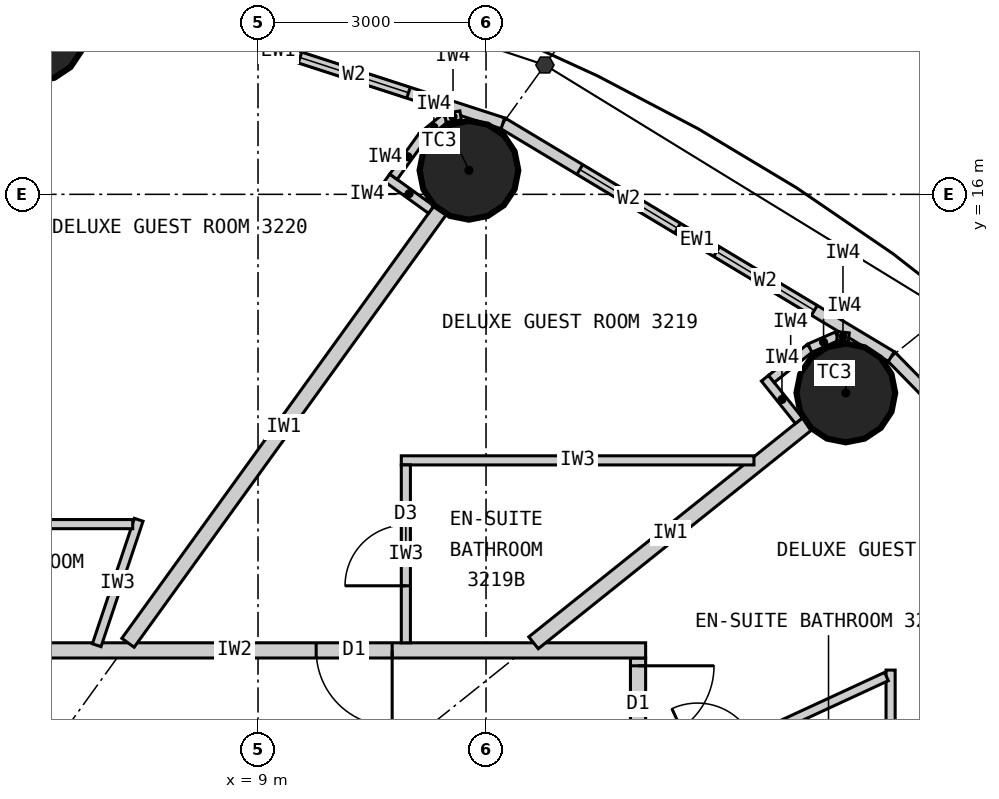
"""IFC4 building model, lengths in metres.
Left out: names, types, materials, properties, quantities, classifications, styles, units other than length and angle.
Written with IfcOpenShell. Run it as: python <this file> out.ifc"""

import sys

from ifc_helpers import new_model, si_unit, direction, frame, frame_2d, origin, origin_2d, place, context, subcontext, project, spatial, rectangle, circle, extrude, element, fill, save


model = new_model("IFC4")
c1 = context("Model", 3, precision=1e-05, world=origin(), true_north=direction((0.0, 1.0)))
c2 = subcontext(c1, "Body", "Model", "MODEL_VIEW")
j1 = project(units=[si_unit("LENGTHUNIT", "METRE"), si_unit("PLANEANGLEUNIT", "RADIAN")], contexts=[c1])
p1 = place(None, origin())
s1 = spatial("IfcSite", under=j1, at=p1, CompositionType="ELEMENT")
p2 = place(p1, origin())
s2 = spatial("IfcBuilding", under=s1, at=p2, CompositionType="ELEMENT")
p3 = place(p2, frame((0.0, 0.0, 125.4)))
s3 = spatial("IfcBuildingStorey", under=s2, at=p3, CompositionType="ELEMENT", Elevation=125.4)
for number, where, z_axis, x_axis in (
    (1, (16.734, 13.387, 0.0), (0.0, 0.0, 1.0), (1.0, 0.0, 0.0)),
    (2, (11.775, 16.316, 0.0), (0.0, 0.0, 1.0), (1.0, 0.0, 0.0)),
    (3, (6.074, 18.135, 0.0), (0.0, 0.0, 1.0), (1.0, 0.0, 0.0)),
):
    element("IfcColumn", number, at=place(p3, frame(where, z_axis=z_axis, x_axis=x_axis)), inside=s3, PredefinedType="COLUMN", context=c2, shape_type="SweptSolid", body=[
        extrude(circle(Radius=0.65, at=origin_2d()), origin(), (0.0, 0.0, 1.0), 3.3),
    ])
p4 = place(p3, frame((21.287, 9.832, 0.0), z_axis=(0.0, 0.0, 1.0), x_axis=(-0.700136650834, 0.714008872605, 0.0)))
e4 = element("IfcWall", 4, at=p4, inside=s3, PredefinedType="ELEMENTEDWALL", context=c2, shape_type="SweptSolid", body=[
    extrude(rectangle(XDim=5.649, YDim=0.15, at=frame_2d((2.825, 0.0))), origin(), (0.0, 0.0, 1.0), 3.12),
])
p5 = place(p4, frame((1.025, 0.0, 0.9)))
e5 = element("IfcOpeningElement", 5, at=p5, cuts=e4, PredefinedType="OPENING", context=c2, shape_type="SweptSolid", body=[
    extrude(rectangle(XDim=1.5, YDim=1.9, at=frame_2d((0.75, 0.95))), frame((0.0, 0.085, 0.0), z_axis=(0.0, -1.0, 0.0), x_axis=(1.0, 0.0, 0.0)), (0.0, 0.0, 1.0), 0.17),
])
p6 = place(p4, frame((3.125, 0.0, 0.9)))
e6 = element("IfcOpeningElement", 6, at=p6, cuts=e4, PredefinedType="OPENING", context=c2, shape_type="SweptSolid", body=[
    extrude(rectangle(XDim=1.5, YDim=1.9, at=frame_2d((0.75, 0.95))), frame((0.0, 0.085, 0.0), z_axis=(0.0, -1.0, 0.0), x_axis=(1.0, 0.0, 0.0)), (0.0, 0.0, 1.0), 0.17),
])
p7 = place(p3, frame((17.332, 13.866, 0.0), z_axis=(0.0, 0.0, 1.0), x_axis=(-0.857308573723, 0.514802884044, 0.0)))
e7 = element("IfcWall", 7, at=p7, inside=s3, PredefinedType="ELEMENTEDWALL", context=c2, shape_type="SweptSolid", body=[
    extrude(rectangle(XDim=5.961, YDim=0.15, at=frame_2d((2.98, 0.0))), origin(), (0.0, 0.0, 1.0), 3.12),
])
p8 = place(p7, frame((1.181, 0.0, 0.9)))
e8 = element("IfcOpeningElement", 8, at=p8, cuts=e7, PredefinedType="OPENING", context=c2, shape_type="SweptSolid", body=[
    extrude(rectangle(XDim=1.5, YDim=1.9, at=frame_2d((0.75, 0.95))), frame((0.0, 0.085, 0.0), z_axis=(0.0, -1.0, 0.0), x_axis=(1.0, 0.0, 0.0)), (0.0, 0.0, 1.0), 0.17),
])
p9 = place(p7, frame((3.281, 0.0, 0.9)))
e9 = element("IfcOpeningElement", 9, at=p9, cuts=e7, PredefinedType="OPENING", context=c2, shape_type="SweptSolid", body=[
    extrude(rectangle(XDim=1.5, YDim=1.9, at=frame_2d((0.75, 0.95))), frame((0.0, 0.085, 0.0), z_axis=(0.0, -1.0, 0.0), x_axis=(1.0, 0.0, 0.0)), (0.0, 0.0, 1.0), 0.17),
])
p10 = place(p3, frame((12.221, 16.935, 0.0), z_axis=(0.0, 0.0, 1.0), x_axis=(-0.951272691506, 0.308350881944, 0.0)))
e10 = element("IfcWall", 10, at=p10, inside=s3, PredefinedType="ELEMENTEDWALL", context=c2, shape_type="SweptSolid", body=[
    extrude(rectangle(XDim=6.211, YDim=0.15, at=frame_2d((3.105, 0.0))), origin(), (0.0, 0.0, 1.0), 3.12),
])
p11 = place(p10, frame((1.305, 0.0, 0.9)))
e11 = element("IfcOpeningElement", 11, at=p11, cuts=e10, PredefinedType="OPENING", context=c2, shape_type="SweptSolid", body=[
    extrude(rectangle(XDim=1.5, YDim=1.9, at=frame_2d((0.75, 0.95))), frame((0.0, 0.085, 0.0), z_axis=(0.0, -1.0, 0.0), x_axis=(1.0, 0.0, 0.0)), (0.0, 0.0, 1.0), 0.17),
])
p12 = place(p10, frame((3.405, 0.0, 0.9)))
e12 = element("IfcOpeningElement", 12, at=p12, cuts=e10, PredefinedType="OPENING", context=c2, shape_type="SweptSolid", body=[
    extrude(rectangle(XDim=1.5, YDim=1.9, at=frame_2d((0.75, 0.95))), frame((0.0, 0.085, 0.0), z_axis=(0.0, -1.0, 0.0), x_axis=(1.0, 0.0, 0.0)), (0.0, 0.0, 1.0), 0.17),
])
p13 = place(p3, frame((14.0, -9.9, 0.0), z_axis=(0.0, 0.0, 1.0), x_axis=(0.0, 1.0, 0.0)))
e13 = element("IfcWall", 13, at=p13, inside=s3, PredefinedType="PARTITIONING", context=c2, shape_type="SweptSolid", body=[
    extrude(rectangle(XDim=19.8, YDim=0.2, at=frame_2d((9.9, 0.0))), origin(), (0.0, 0.0, 1.0), 3.12),
])
p14 = place(p13, frame((2.478, 0.0, 0.0)))
e14 = element("IfcOpeningElement", 14, at=p14, cuts=e13, PredefinedType="OPENING", context=c2, shape_type="SweptSolid", body=[
    extrude(rectangle(XDim=1.0, YDim=2.2, at=frame_2d((0.5, 1.1))), frame((0.0, 0.11, 0.0), z_axis=(0.0, -1.0, 0.0), x_axis=(1.0, 0.0, 0.0)), (0.0, 0.0, 1.0), 0.22),
])
p15 = place(p13, frame((8.838, 0.0, 0.0)))
e15 = element("IfcOpeningElement", 15, at=p15, cuts=e13, PredefinedType="OPENING", context=c2, shape_type="SweptSolid", body=[
    extrude(rectangle(XDim=1.0, YDim=2.2, at=frame_2d((0.5, 1.1))), frame((0.0, 0.11, 0.0), z_axis=(0.0, -1.0, 0.0), x_axis=(1.0, 0.0, 0.0)), (0.0, 0.0, 1.0), 0.22),
])
p16 = place(p13, frame((13.742, 0.0, 0.0)))
e16 = element("IfcOpeningElement", 16, at=p16, cuts=e13, PredefinedType="OPENING", context=c2, shape_type="SweptSolid", body=[
    extrude(rectangle(XDim=1.0, YDim=2.2, at=frame_2d((0.5, 1.1))), frame((0.0, 0.11, 0.0), z_axis=(0.0, -1.0, 0.0), x_axis=(1.0, 0.0, 0.0)), (0.0, 0.0, 1.0), 0.22),
])
p17 = place(p13, frame((18.698, 0.0, 0.0)))
e17 = element("IfcOpeningElement", 17, at=p17, cuts=e13, PredefinedType="OPENING", context=c2, shape_type="SweptSolid", body=[
    extrude(rectangle(XDim=1.0, YDim=2.2, at=frame_2d((0.5, 1.1))), frame((0.0, 0.11, 0.0), z_axis=(0.0, -1.0, 0.0), x_axis=(1.0, 0.0, 0.0)), (0.0, 0.0, 1.0), 0.22),
])
p18 = place(p3, frame((3.283, 10.0, 0.0), z_axis=(0.0, 0.0, 1.0), x_axis=(1.0, 0.0, 0.0)))
e18 = element("IfcWall", 18, at=p18, inside=s3, PredefinedType="PARTITIONING", context=c2, shape_type="SweptSolid", body=[
    extrude(rectangle(XDim=10.817, YDim=0.2, at=frame_2d((5.409, 0.0))), origin(), (0.0, 0.0, 1.0), 3.12),
])
p19 = place(p18, frame((6.482, 0.0, 0.0)))
e19 = element("IfcOpeningElement", 19, at=p19, cuts=e18, PredefinedType="OPENING", context=c2, shape_type="SweptSolid", body=[
    extrude(rectangle(XDim=1.0, YDim=2.2, at=frame_2d((0.5, 1.1))), frame((0.0, 0.11, 0.0), z_axis=(0.0, -1.0, 0.0), x_axis=(1.0, 0.0, 0.0)), (0.0, 0.0, 1.0), 0.22),
])
p20 = place(p3, frame((14.1, 6.512, 0.0), z_axis=(0.0, 0.0, 1.0), x_axis=(0.907833019998, 0.419331858797, 0.0)))
e20 = element("IfcWall", 20, at=p20, inside=s3, PredefinedType="PARTITIONING", context=c2, shape_type="SweptSolid", body=[
    extrude(rectangle(XDim=6.505, YDim=0.2, at=frame_2d((3.252, 0.0))), origin(), (0.0, 0.0, 1.0), 2.27),
])
p21 = place(p3, frame((12.625, 10.1, 0.0), z_axis=(0.0, 0.0, 1.0), x_axis=(0.780863644897, 0.624701503182, 0.0)))
e21 = element("IfcWall", 21, at=p21, inside=s3, PredefinedType="PARTITIONING", context=c2, shape_type="SweptSolid", body=[
    extrude(rectangle(XDim=4.612, YDim=0.2, at=frame_2d((2.306, 0.0))), origin(), (0.0, 0.0, 1.0), 2.37),
])
p22 = place(p3, frame((7.289, 10.1, 0.0), z_axis=(0.0, 0.0, 1.0), x_axis=(0.585217367024, 0.81087645997, 0.0)))
e22 = element("IfcWall", 22, at=p22, inside=s3, PredefinedType="PARTITIONING", context=c2, shape_type="SweptSolid", body=[
    extrude(rectangle(XDim=7.016, YDim=0.2, at=frame_2d((3.508, 0.0))), origin(), (0.0, 0.0, 1.0), 2.37),
])
p23 = place(p3, frame((17.323, 8.101, 0.0), z_axis=(0.0, 0.0, 1.0), x_axis=(0.0, 1.0, 0.0)))
e23 = element("IfcWall", 23, at=p23, inside=s3, PredefinedType="PARTITIONING", context=c2, shape_type="SweptSolid", body=[
    extrude(rectangle(XDim=1.64, YDim=0.12, at=frame_2d((0.82, 0.0))), origin(), (0.0, 0.0, 1.0), 3.12),
])
p24 = place(p3, frame((14.1, 8.193, 0.0), z_axis=(0.0, 0.0, 1.0), x_axis=(0.907836493557, 0.419324338628, 0.0)))
e24 = element("IfcWall", 24, at=p24, inside=s3, PredefinedType="PARTITIONING", context=c2, shape_type="SweptSolid", body=[
    extrude(rectangle(XDim=3.49, YDim=0.12, at=frame_2d((1.745, 0.0))), origin(), (0.0, 0.0, 1.0), 3.12),
])
p25 = place(p24, frame((0.75, 0.0, 0.0)))
e25 = element("IfcOpeningElement", 25, at=p25, cuts=e24, PredefinedType="OPENING", context=c2, shape_type="SweptSolid", body=[
    extrude(rectangle(XDim=0.8, YDim=2.1, at=frame_2d((0.4, 1.05))), frame((0.0, 0.07, 0.0), z_axis=(0.0, -1.0, 0.0), x_axis=(1.0, 0.0, 0.0)), (0.0, 0.0, 1.0), 0.14),
])
p26 = place(p3, frame((15.525, 12.5, 0.0), z_axis=(0.0, 0.0, 1.0), x_axis=(-1.0, 0.0, 0.0)))
e26 = element("IfcWall", 26, at=p26, inside=s3, PredefinedType="PARTITIONING", context=c2, shape_type="SweptSolid", body=[
    extrude(rectangle(XDim=4.64, YDim=0.12, at=frame_2d((2.32, 0.0))), origin(), (0.0, 0.0, 1.0), 3.12),
])
p27 = place(p3, frame((10.945, 10.1, 0.0), z_axis=(0.0, 0.0, 1.0), x_axis=(0.0, 1.0, 0.0)))
e27 = element("IfcWall", 27, at=p27, inside=s3, PredefinedType="PARTITIONING", context=c2, shape_type="SweptSolid", body=[
    extrude(rectangle(XDim=2.34, YDim=0.12, at=frame_2d((1.17, 0.0))), origin(), (0.0, 0.0, 1.0), 3.12),
])
p28 = place(p27, frame((0.75, 0.0, 0.0)))
e28 = element("IfcOpeningElement", 28, at=p28, cuts=e27, PredefinedType="OPENING", context=c2, shape_type="SweptSolid", body=[
    extrude(rectangle(XDim=0.8, YDim=2.1, at=frame_2d((0.4, 1.05))), frame((0.0, 0.07, 0.0), z_axis=(0.0, -1.0, 0.0), x_axis=(1.0, 0.0, 0.0)), (0.0, 0.0, 1.0), 0.14),
])
p29 = place(p3, frame((6.878, 10.068, 0.0), z_axis=(0.0, 0.0, 1.0), x_axis=(0.317532394508, 0.948247424694, 0.0)))
e29 = element("IfcWall", 29, at=p29, inside=s3, PredefinedType="PARTITIONING", context=c2, shape_type="SweptSolid", body=[
    extrude(rectangle(XDim=1.74, YDim=0.12, at=frame_2d((0.87, 0.0))), origin(), (0.0, 0.0, 1.0), 3.12),
])
p30 = place(p3, frame((4.011, 11.661, 0.0), z_axis=(0.0, 0.0, 1.0), x_axis=(1.0, 0.0, 0.0)))
e30 = element("IfcWall", 30, at=p30, inside=s3, PredefinedType="PARTITIONING", context=c2, shape_type="SweptSolid", body=[
    extrude(rectangle(XDim=3.34, YDim=0.12, at=frame_2d((1.67, 0.0))), origin(), (0.0, 0.0, 1.0), 3.12),
])
p31 = place(p30, frame((0.75, 0.0, 0.0)))
e31 = element("IfcOpeningElement", 31, at=p31, cuts=e30, PredefinedType="OPENING", context=c2, shape_type="SweptSolid", body=[
    extrude(rectangle(XDim=0.8, YDim=2.1, at=frame_2d((0.4, 1.05))), frame((0.0, 0.07, 0.0), z_axis=(0.0, -1.0, 0.0), x_axis=(1.0, 0.0, 0.0)), (0.0, 0.0, 1.0), 0.14),
])
p32 = place(p3, frame((16.117, 13.022, 0.0), z_axis=(0.0, 0.0, 1.0), x_axis=(-0.62465344249, 0.780902091677, 0.0)))
e32 = element("IfcWall", 32, at=p32, inside=s3, PredefinedType="PARTITIONING", context=c2, shape_type="SweptSolid", body=[
    extrude(rectangle(XDim=0.716, YDim=0.12, at=frame_2d((0.358, 0.0))), origin(), (0.0, 0.0, 1.0), 3.12),
])
p33 = place(p3, frame((15.754, 13.571, 0.0), z_axis=(0.0, 0.0, 1.0), x_axis=(0.780905453553, 0.624649239663, 0.0)))
e33 = element("IfcWall", 33, at=p33, inside=s3, PredefinedType="PARTITIONING", context=c2, shape_type="SweptSolid", body=[
    extrude(rectangle(XDim=0.65, YDim=0.12, at=frame_2d((0.325, 0.0))), origin(), (0.0, 0.0, 1.0), 3.12),
])
p34 = place(p3, frame((16.262, 13.977, 0.0), z_axis=(0.0, 0.0, 1.0), x_axis=(0.915985403703, 0.401211590314, 0.0)))
e34 = element("IfcWall", 34, at=p34, inside=s3, PredefinedType="PARTITIONING", context=c2, shape_type="SweptSolid", body=[
    extrude(rectangle(XDim=0.391, YDim=0.12, at=frame_2d((0.196, 0.0))), origin(), (0.0, 0.0, 1.0), 3.12),
])
p35 = place(p3, frame((16.62, 14.134, 0.0), z_axis=(0.0, 0.0, 1.0), x_axis=(0.993941871493, -0.109907033867, 0.0)))
e35 = element("IfcWall", 35, at=p35, inside=s3, PredefinedType="PARTITIONING", context=c2, shape_type="SweptSolid", body=[
    extrude(rectangle(XDim=0.153, YDim=0.12, at=frame_2d((0.077, 0.0))), origin(), (0.0, 0.0, 1.0), 3.12),
])
p36 = place(p3, frame((11.279, 15.799, 0.0), z_axis=(0.0, 0.0, 1.0), x_axis=(-0.810912957127, 0.585166793285, 0.0)))
e36 = element("IfcWall", 36, at=p36, inside=s3, PredefinedType="PARTITIONING", context=c2, shape_type="SweptSolid", body=[
    extrude(rectangle(XDim=0.716, YDim=0.12, at=frame_2d((0.358, 0.0))), origin(), (0.0, 0.0, 1.0), 3.12),
])
p37 = place(p3, frame((10.782, 16.231, 0.0), z_axis=(0.0, 0.0, 1.0), x_axis=(0.585175102182, 0.810906961239, 0.0)))
e37 = element("IfcWall", 37, at=p37, inside=s3, PredefinedType="PARTITIONING", context=c2, shape_type="SweptSolid", body=[
    extrude(rectangle(XDim=0.65, YDim=0.12, at=frame_2d((0.325, 0.0))), origin(), (0.0, 0.0, 1.0), 3.12),
])
p38 = place(p3, frame((11.162, 16.759, 0.0), z_axis=(0.0, 0.0, 1.0), x_axis=(0.775178428527, 0.63174235567, 0.0)))
e38 = element("IfcWall", 38, at=p38, inside=s3, PredefinedType="PARTITIONING", context=c2, shape_type="SweptSolid", body=[
    extrude(rectangle(XDim=0.392, YDim=0.12, at=frame_2d((0.196, 0.0))), origin(), (0.0, 0.0, 1.0), 3.12),
])
p39 = place(p3, frame((11.466, 17.006, 0.0), z_axis=(0.0, 0.0, 1.0), x_axis=(0.987228877621, 0.15930832744, 0.0)))
e39 = element("IfcWall", 39, at=p39, inside=s3, PredefinedType="PARTITIONING", context=c2, shape_type="SweptSolid", body=[
    extrude(rectangle(XDim=0.202, YDim=0.12, at=frame_2d((0.101, 0.0))), origin(), (0.0, 0.0, 1.0), 3.12),
])
p40 = place(p8, origin())
e40 = element("IfcWindow", 40, at=p40, inside=s3, PartitioningType="SINGLE_PANEL", PredefinedType="WINDOW", context=c2, shape_type="SweptSolid", body=[
    extrude(rectangle(XDim=1.5, YDim=1.9, at=frame_2d((0.75, 0.95))), frame((0.0, 0.03, 0.0), z_axis=(0.0, -1.0, 0.0), x_axis=(1.0, 0.0, 0.0)), (0.0, 0.0, 1.0), 0.06),
])
fill(e8, e40)
p41 = place(p9, origin())
e41 = element("IfcWindow", 41, at=p41, inside=s3, PartitioningType="SINGLE_PANEL", PredefinedType="WINDOW", context=c2, shape_type="SweptSolid", body=[
    extrude(rectangle(XDim=1.5, YDim=1.9, at=frame_2d((0.75, 0.95))), frame((0.0, 0.03, 0.0), z_axis=(0.0, -1.0, 0.0), x_axis=(1.0, 0.0, 0.0)), (0.0, 0.0, 1.0), 0.06),
])
fill(e9, e41)
p42 = place(p11, origin())
e42 = element("IfcWindow", 42, at=p42, inside=s3, PartitioningType="SINGLE_PANEL", PredefinedType="WINDOW", context=c2, shape_type="SweptSolid", body=[
    extrude(rectangle(XDim=1.5, YDim=1.9, at=frame_2d((0.75, 0.95))), frame((0.0, 0.03, 0.0), z_axis=(0.0, -1.0, 0.0), x_axis=(1.0, 0.0, 0.0)), (0.0, 0.0, 1.0), 0.06),
])
fill(e11, e42)
p43 = place(p17, origin())
e43 = element("IfcDoor", 43, at=p43, inside=s3, OperationType="SINGLE_SWING_RIGHT", PredefinedType="DOOR", context=c2, shape_type="SweptSolid", body=[
    extrude(rectangle(XDim=1.0, YDim=2.2, at=frame_2d((0.5, 1.1))), frame((0.0, 0.025, 0.0), z_axis=(0.0, -1.0, 0.0), x_axis=(1.0, 0.0, 0.0)), (0.0, 0.0, 1.0), 0.05),
])
fill(e17, e43)
p44 = place(p28, origin())
e44 = element("IfcDoor", 44, at=p44, inside=s3, OperationType="SINGLE_SWING_LEFT", PredefinedType="DOOR", context=c2, shape_type="SweptSolid", body=[
    extrude(rectangle(XDim=0.8, YDim=2.1, at=frame_2d((0.4, 1.05))), frame((0.0, 0.025, 0.0), z_axis=(0.0, -1.0, 0.0), x_axis=(1.0, 0.0, 0.0)), (0.0, 0.0, 1.0), 0.05),
])
fill(e28, e44)
p45 = place(p19, origin())
e45 = element("IfcDoor", 45, at=p45, inside=s3, OperationType="SINGLE_SWING_RIGHT", PredefinedType="DOOR", context=c2, shape_type="SweptSolid", body=[
    extrude(rectangle(XDim=1.0, YDim=2.2, at=frame_2d((0.5, 1.1))), frame((0.0, 0.025, 0.0), z_axis=(0.0, -1.0, 0.0), x_axis=(1.0, 0.0, 0.0)), (0.0, 0.0, 1.0), 0.05),
])
fill(e19, e45)
save(model, sys.argv[1])
